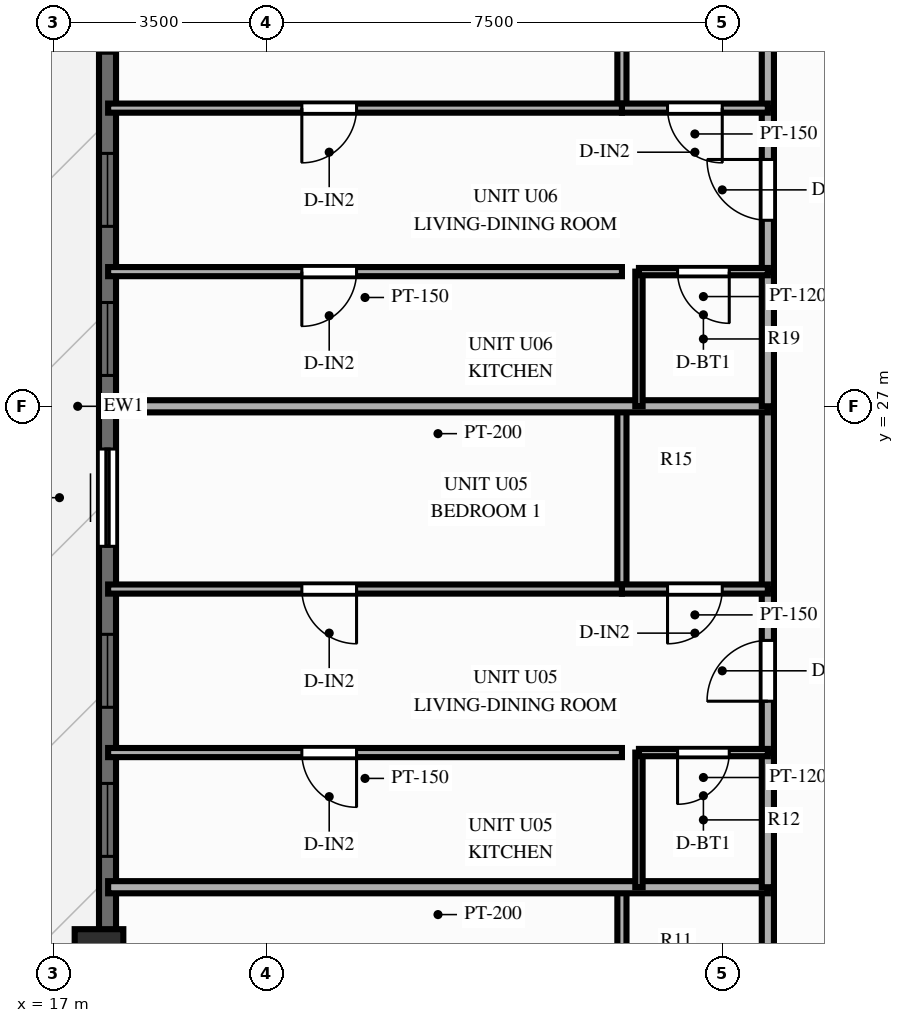
"""IFC4 building model, lengths in metres.
Left out: names, types, materials, properties, quantities, classifications, styles, units other than length and angle.
Written with IfcOpenShell. Run it as: python <this file> out.ifc"""

import sys

from ifc_helpers import new_model, si_unit, direction, frame, frame_2d, origin, origin_2d, place, context, subcontext, project, spatial, rectangle, extrude, source, transform, mapped, element, fill, save


model = new_model("IFC4")
c1 = context("Model", 3, precision=1e-05, world=origin(), true_north=direction((0.0, 1.0)))
c2 = subcontext(c1, "Body", "Model", "MODEL_VIEW")
j1 = project(units=[si_unit("LENGTHUNIT", "METRE"), si_unit("PLANEANGLEUNIT", "RADIAN")], contexts=[c1])
p1 = place(None, origin())
s1 = spatial("IfcSite", under=j1, at=p1, CompositionType="ELEMENT")
p2 = place(p1, origin())
s2 = spatial("IfcBuilding", under=s1, at=p2, CompositionType="ELEMENT")
p3 = place(p2, frame((0.0, 0.0, 192.7)))
s3 = spatial("IfcBuildingStorey", under=s2, at=p3, CompositionType="ELEMENT", Elevation=192.7)
m1 = source(origin(), c2, "Body", "SweptSolid", [
    extrude(rectangle(XDim=0.8, YDim=0.8, at=origin_2d()), origin(), (0.0, 0.0, 1.0), 3.9),
])
p4 = place(p3, frame((17.75, 18.0, 0.0), z_axis=(0.0, 0.0, 1.0), x_axis=(1.0, 0.0, 0.0)))
e1 = element("IfcColumn", 1, at=p4, inside=s3, PredefinedType="COLUMN", context=c2, shape_type="MappedRepresentation", body=[
    mapped(m1, transform((0.0, 0.0, 0.0), scale=1.0)),
])
p5 = place(p3, frame((17.89, 11.0, 0.0), z_axis=(0.0, 0.0, 1.0), x_axis=(0.0, 1.0, 0.0)))
e2 = element("IfcWall", 2, at=p5, inside=s3, PredefinedType="SOLIDWALL", context=c2, shape_type="SweptSolid", body=[
    extrude(rectangle(XDim=32.0, YDim=0.28, at=frame_2d((16.0, 0.0))), origin(), (0.0, 0.0, 1.0), 2.44),
])
p6 = place(p5, frame((0.717, 0.0, 0.25)))
e3 = element("IfcOpeningElement", 3, at=p6, cuts=e2, PredefinedType="OPENING", context=c2, shape_type="SweptSolid", body=[
    extrude(rectangle(XDim=1.2, YDim=1.5, at=frame_2d((0.6, 0.75))), frame((0.0, 0.152, 0.0), z_axis=(0.0, -1.0, 0.0), x_axis=(1.0, 0.0, 0.0)), (0.0, 0.0, 1.0), 0.304),
])
p7 = place(p5, frame((3.139, 0.0, 0.25)))
e4 = element("IfcOpeningElement", 4, at=p7, cuts=e2, PredefinedType="OPENING", context=c2, shape_type="SweptSolid", body=[
    extrude(rectangle(XDim=1.2, YDim=1.5, at=frame_2d((0.6, 0.75))), frame((0.0, 0.152, 0.0), z_axis=(0.0, -1.0, 0.0), x_axis=(1.0, 0.0, 0.0)), (0.0, 0.0, 1.0), 0.304),
])
p8 = place(p5, frame((5.447, 0.0, 0.25)))
e5 = element("IfcOpeningElement", 5, at=p8, cuts=e2, PredefinedType="OPENING", context=c2, shape_type="SweptSolid", body=[
    extrude(rectangle(XDim=0.95, YDim=1.5, at=frame_2d((0.475, 0.75))), frame((0.0, 0.152, 0.0), z_axis=(0.0, -1.0, 0.0), x_axis=(1.0, 0.0, 0.0)), (0.0, 0.0, 1.0), 0.304),
])
p9 = place(p5, frame((8.597, 0.0, 0.25)))
e6 = element("IfcOpeningElement", 6, at=p9, cuts=e2, PredefinedType="OPENING", context=c2, shape_type="SweptSolid", body=[
    extrude(rectangle(XDim=1.2, YDim=1.5, at=frame_2d((0.6, 0.75))), frame((0.0, 0.152, 0.0), z_axis=(0.0, -1.0, 0.0), x_axis=(1.0, 0.0, 0.0)), (0.0, 0.0, 1.0), 0.304),
])
p10 = place(p5, frame((11.05, 0.0, 0.25)))
e7 = element("IfcOpeningElement", 7, at=p10, cuts=e2, PredefinedType="OPENING", context=c2, shape_type="SweptSolid", body=[
    extrude(rectangle(XDim=1.2, YDim=1.5, at=frame_2d((0.6, 0.75))), frame((0.0, 0.152, 0.0), z_axis=(0.0, -1.0, 0.0), x_axis=(1.0, 0.0, 0.0)), (0.0, 0.0, 1.0), 0.304),
])
p11 = place(p5, frame((13.697, 0.0, 0.0)))
e8 = element("IfcOpeningElement", 8, at=p11, cuts=e2, PredefinedType="OPENING", context=c2, shape_type="SweptSolid", body=[
    extrude(rectangle(XDim=1.6, YDim=2.15, at=frame_2d((0.8, 1.075))), frame((0.0, 0.152, 0.0), z_axis=(0.0, -1.0, 0.0), x_axis=(1.0, 0.0, 0.0)), (0.0, 0.0, 1.0), 0.304),
])
p12 = place(p5, frame((16.507, 0.0, 0.25)))
e9 = element("IfcOpeningElement", 9, at=p12, cuts=e2, PredefinedType="OPENING", context=c2, shape_type="SweptSolid", body=[
    extrude(rectangle(XDim=1.2, YDim=1.5, at=frame_2d((0.6, 0.75))), frame((0.0, 0.152, 0.0), z_axis=(0.0, -1.0, 0.0), x_axis=(1.0, 0.0, 0.0)), (0.0, 0.0, 1.0), 0.304),
])
p13 = place(p5, frame((18.959, 0.0, 0.25)))
e10 = element("IfcOpeningElement", 10, at=p13, cuts=e2, PredefinedType="OPENING", context=c2, shape_type="SweptSolid", body=[
    extrude(rectangle(XDim=1.2, YDim=1.5, at=frame_2d((0.6, 0.75))), frame((0.0, 0.152, 0.0), z_axis=(0.0, -1.0, 0.0), x_axis=(1.0, 0.0, 0.0)), (0.0, 0.0, 1.0), 0.304),
])
p14 = place(p5, frame((21.807, 0.0, 0.25)))
e11 = element("IfcOpeningElement", 11, at=p14, cuts=e2, PredefinedType="OPENING", context=c2, shape_type="SweptSolid", body=[
    extrude(rectangle(XDim=1.2, YDim=1.5, at=frame_2d((0.6, 0.75))), frame((0.0, 0.152, 0.0), z_axis=(0.0, -1.0, 0.0), x_axis=(1.0, 0.0, 0.0)), (0.0, 0.0, 1.0), 0.304),
])
p15 = place(p5, frame((26.967, 0.0, 0.25)))
e12 = element("IfcOpeningElement", 12, at=p15, cuts=e2, PredefinedType="OPENING", context=c2, shape_type="SweptSolid", body=[
    extrude(rectangle(XDim=1.2, YDim=1.5, at=frame_2d((0.6, 0.75))), frame((0.0, 0.152, 0.0), z_axis=(0.0, -1.0, 0.0), x_axis=(1.0, 0.0, 0.0)), (0.0, 0.0, 1.0), 0.304),
])
p16 = place(p5, frame((29.687, 0.0, 0.25)))
e13 = element("IfcOpeningElement", 13, at=p16, cuts=e2, PredefinedType="OPENING", context=c2, shape_type="SweptSolid", body=[
    extrude(rectangle(XDim=1.2, YDim=1.5, at=frame_2d((0.6, 0.75))), frame((0.0, 0.152, 0.0), z_axis=(0.0, -1.0, 0.0), x_axis=(1.0, 0.0, 0.0)), (0.0, 0.0, 1.0), 0.304),
])
p17 = place(p3, frame((28.75, 16.084, 0.0), z_axis=(0.0, 0.0, 1.0), x_axis=(0.0, 1.0, 0.0)))
e14 = element("IfcWall", 14, at=p17, inside=s3, PredefinedType="PARTITIONING", context=c2, shape_type="SweptSolid", body=[
    extrude(rectangle(XDim=3.006, YDim=0.2, at=frame_2d((1.503, 0.0))), origin(), (0.0, 0.0, 1.0), 3.56),
])
p18 = place(p3, frame((26.35, 16.084, 0.0), z_axis=(0.0, 0.0, 1.0), x_axis=(0.0, 1.0, 0.0)))
e15 = element("IfcWall", 15, at=p18, inside=s3, PredefinedType="PARTITIONING", context=c2, shape_type="SweptSolid", body=[
    extrude(rectangle(XDim=3.006, YDim=0.15, at=frame_2d((1.503, 0.0))), origin(), (0.0, 0.0, 1.0), 3.56),
])
p19 = place(p3, frame((28.75, 19.09, 0.0), z_axis=(0.0, 0.0, 1.0), x_axis=(-1.0, 0.0, 0.0)))
e16 = element("IfcWall", 16, at=p19, inside=s3, PredefinedType="PARTITIONING", context=c2, shape_type="SweptSolid", body=[
    extrude(rectangle(XDim=10.85, YDim=0.2, at=frame_2d((5.425, 0.0))), origin(), (0.0, 0.0, 1.0), 3.56),
])
p20 = place(p3, frame((28.75, 19.09, 0.0), z_axis=(0.0, 0.0, 1.0), x_axis=(0.0, 1.0, 0.0)))
e17 = element("IfcWall", 17, at=p20, inside=s3, PredefinedType="PARTITIONING", context=c2, shape_type="SweptSolid", body=[
    extrude(rectangle(XDim=2.215, YDim=0.2, at=frame_2d((1.107, 0.0))), origin(), (0.0, 0.0, 1.0), 3.56),
])
p21 = place(p3, frame((28.75, 21.305, 0.0), z_axis=(0.0, 0.0, 1.0), x_axis=(0.0, 1.0, 0.0)))
e18 = element("IfcWall", 18, at=p21, inside=s3, PredefinedType="PARTITIONING", context=c2, shape_type="SweptSolid", body=[
    extrude(rectangle(XDim=2.689, YDim=0.2, at=frame_2d((1.345, 0.0))), origin(), (0.0, 0.0, 1.0), 3.56),
])
p22 = place(p21, frame((0.845, 0.0, 0.0)))
e19 = element("IfcOpeningElement", 19, at=p22, cuts=e18, PredefinedType="OPENING", context=c2, shape_type="SweptSolid", body=[
    extrude(rectangle(XDim=1.0, YDim=2.15, at=frame_2d((0.5, 1.075))), frame((0.0, 0.112, 0.0), z_axis=(0.0, -1.0, 0.0), x_axis=(1.0, 0.0, 0.0)), (0.0, 0.0, 1.0), 0.224),
])
p23 = place(p3, frame((28.75, 23.994, 0.0), z_axis=(0.0, 0.0, 1.0), x_axis=(0.0, 1.0, 0.0)))
e20 = element("IfcWall", 20, at=p23, inside=s3, PredefinedType="PARTITIONING", context=c2, shape_type="SweptSolid", body=[
    extrude(rectangle(XDim=3.006, YDim=0.2, at=frame_2d((1.503, 0.0))), origin(), (0.0, 0.0, 1.0), 3.56),
])
p24 = place(p3, frame((26.63, 19.09, 0.0), z_axis=(0.0, 0.0, 1.0), x_axis=(0.0, 1.0, 0.0)))
e21 = element("IfcWall", 21, at=p24, inside=s3, PredefinedType="PARTITIONING", context=c2, shape_type="SweptSolid", body=[
    extrude(rectangle(XDim=2.215, YDim=0.12, at=frame_2d((1.107, 0.0))), origin(), (0.0, 0.0, 1.0), 3.56),
])
p25 = place(p3, frame((26.35, 23.994, 0.0), z_axis=(0.0, 0.0, 1.0), x_axis=(0.0, 1.0, 0.0)))
e22 = element("IfcWall", 22, at=p25, inside=s3, PredefinedType="PARTITIONING", context=c2, shape_type="SweptSolid", body=[
    extrude(rectangle(XDim=3.006, YDim=0.15, at=frame_2d((1.503, 0.0))), origin(), (0.0, 0.0, 1.0), 3.56),
])
p26 = place(p3, frame((28.75, 21.305, 0.0), z_axis=(0.0, 0.0, 1.0), x_axis=(-1.0, 0.0, 0.0)))
e23 = element("IfcWall", 23, at=p26, inside=s3, PredefinedType="PARTITIONING", context=c2, shape_type="SweptSolid", body=[
    extrude(rectangle(XDim=2.12, YDim=0.12, at=frame_2d((1.06, 0.0))), origin(), (0.0, 0.0, 1.0), 3.56),
])
p27 = place(p26, frame((0.635, 0.0, 0.0)))
e24 = element("IfcOpeningElement", 24, at=p27, cuts=e23, PredefinedType="OPENING", context=c2, shape_type="SweptSolid", body=[
    extrude(rectangle(XDim=0.85, YDim=2.05, at=frame_2d((0.425, 1.025))), frame((0.0, 0.072, 0.0), z_axis=(0.0, -1.0, 0.0), x_axis=(1.0, 0.0, 0.0)), (0.0, 0.0, 1.0), 0.144),
])
p28 = place(p3, frame((26.35, 21.305, 0.0), z_axis=(0.0, 0.0, 1.0), x_axis=(-1.0, 0.0, 0.0)))
e25 = element("IfcWall", 25, at=p28, inside=s3, PredefinedType="PARTITIONING", context=c2, shape_type="SweptSolid", body=[
    extrude(rectangle(XDim=8.45, YDim=0.15, at=frame_2d((4.225, 0.0))), origin(), (0.0, 0.0, 1.0), 3.56),
])
p29 = place(p28, frame((4.364, 0.0, 0.0)))
e26 = element("IfcOpeningElement", 26, at=p29, cuts=e25, PredefinedType="OPENING", context=c2, shape_type="SweptSolid", body=[
    extrude(rectangle(XDim=0.9, YDim=2.1, at=frame_2d((0.45, 1.05))), frame((0.0, 0.087, 0.0), z_axis=(0.0, -1.0, 0.0), x_axis=(1.0, 0.0, 0.0)), (0.0, 0.0, 1.0), 0.174),
])
p30 = place(p3, frame((28.75, 23.994, 0.0), z_axis=(0.0, 0.0, 1.0), x_axis=(-1.0, 0.0, 0.0)))
e27 = element("IfcWall", 27, at=p30, inside=s3, PredefinedType="PARTITIONING", context=c2, shape_type="SweptSolid", body=[
    extrude(rectangle(XDim=2.4, YDim=0.15, at=frame_2d((1.2, 0.0))), origin(), (0.0, 0.0, 1.0), 3.56),
])
p31 = place(p30, frame((0.75, 0.0, 0.0)))
e28 = element("IfcOpeningElement", 28, at=p31, cuts=e27, PredefinedType="OPENING", context=c2, shape_type="SweptSolid", body=[
    extrude(rectangle(XDim=0.9, YDim=2.1, at=frame_2d((0.45, 1.05))), frame((0.0, 0.087, 0.0), z_axis=(0.0, -1.0, 0.0), x_axis=(1.0, 0.0, 0.0)), (0.0, 0.0, 1.0), 0.174),
])
p32 = place(p3, frame((26.35, 23.994, 0.0), z_axis=(0.0, 0.0, 1.0), x_axis=(-1.0, 0.0, 0.0)))
e29 = element("IfcWall", 29, at=p32, inside=s3, PredefinedType="PARTITIONING", context=c2, shape_type="SweptSolid", body=[
    extrude(rectangle(XDim=8.45, YDim=0.15, at=frame_2d((4.225, 0.0))), origin(), (0.0, 0.0, 1.0), 3.56),
])
p33 = place(p32, frame((4.364, 0.0, 0.0)))
e30 = element("IfcOpeningElement", 30, at=p33, cuts=e29, PredefinedType="OPENING", context=c2, shape_type="SweptSolid", body=[
    extrude(rectangle(XDim=0.9, YDim=2.1, at=frame_2d((0.45, 1.05))), frame((0.0, 0.087, 0.0), z_axis=(0.0, -1.0, 0.0), x_axis=(1.0, 0.0, 0.0)), (0.0, 0.0, 1.0), 0.174),
])
p34 = place(p3, frame((28.75, 27.0, 0.0), z_axis=(0.0, 0.0, 1.0), x_axis=(-1.0, 0.0, 0.0)))
e31 = element("IfcWall", 31, at=p34, inside=s3, PredefinedType="PARTITIONING", context=c2, shape_type="SweptSolid", body=[
    extrude(rectangle(XDim=10.85, YDim=0.2, at=frame_2d((5.425, 0.0))), origin(), (0.0, 0.0, 1.0), 3.56),
])
p35 = place(p3, frame((28.75, 27.0, 0.0), z_axis=(0.0, 0.0, 1.0), x_axis=(0.0, 1.0, 0.0)))
e32 = element("IfcWall", 32, at=p35, inside=s3, PredefinedType="PARTITIONING", context=c2, shape_type="SweptSolid", body=[
    extrude(rectangle(XDim=2.215, YDim=0.2, at=frame_2d((1.107, 0.0))), origin(), (0.0, 0.0, 1.0), 3.56),
])
p36 = place(p3, frame((28.75, 29.215, 0.0), z_axis=(0.0, 0.0, 1.0), x_axis=(0.0, 1.0, 0.0)))
e33 = element("IfcWall", 33, at=p36, inside=s3, PredefinedType="PARTITIONING", context=c2, shape_type="SweptSolid", body=[
    extrude(rectangle(XDim=2.689, YDim=0.2, at=frame_2d((1.345, 0.0))), origin(), (0.0, 0.0, 1.0), 3.56),
])
p37 = place(p36, frame((0.845, 0.0, 0.0)))
e34 = element("IfcOpeningElement", 34, at=p37, cuts=e33, PredefinedType="OPENING", context=c2, shape_type="SweptSolid", body=[
    extrude(rectangle(XDim=1.0, YDim=2.15, at=frame_2d((0.5, 1.075))), frame((0.0, 0.112, 0.0), z_axis=(0.0, -1.0, 0.0), x_axis=(1.0, 0.0, 0.0)), (0.0, 0.0, 1.0), 0.224),
])
p38 = place(p3, frame((28.75, 31.904, 0.0), z_axis=(0.0, 0.0, 1.0), x_axis=(0.0, 1.0, 0.0)))
e35 = element("IfcWall", 35, at=p38, inside=s3, PredefinedType="PARTITIONING", context=c2, shape_type="SweptSolid", body=[
    extrude(rectangle(XDim=3.006, YDim=0.2, at=frame_2d((1.503, 0.0))), origin(), (0.0, 0.0, 1.0), 3.56),
])
p39 = place(p3, frame((26.63, 27.0, 0.0), z_axis=(0.0, 0.0, 1.0), x_axis=(0.0, 1.0, 0.0)))
e36 = element("IfcWall", 36, at=p39, inside=s3, PredefinedType="PARTITIONING", context=c2, shape_type="SweptSolid", body=[
    extrude(rectangle(XDim=2.215, YDim=0.12, at=frame_2d((1.107, 0.0))), origin(), (0.0, 0.0, 1.0), 3.56),
])
p40 = place(p3, frame((26.35, 31.904, 0.0), z_axis=(0.0, 0.0, 1.0), x_axis=(0.0, 1.0, 0.0)))
e37 = element("IfcWall", 37, at=p40, inside=s3, PredefinedType="PARTITIONING", context=c2, shape_type="SweptSolid", body=[
    extrude(rectangle(XDim=3.006, YDim=0.15, at=frame_2d((1.503, 0.0))), origin(), (0.0, 0.0, 1.0), 3.56),
])
p41 = place(p3, frame((28.75, 29.215, 0.0), z_axis=(0.0, 0.0, 1.0), x_axis=(-1.0, 0.0, 0.0)))
e38 = element("IfcWall", 38, at=p41, inside=s3, PredefinedType="PARTITIONING", context=c2, shape_type="SweptSolid", body=[
    extrude(rectangle(XDim=2.12, YDim=0.12, at=frame_2d((1.06, 0.0))), origin(), (0.0, 0.0, 1.0), 3.56),
])
p42 = place(p41, frame((0.635, 0.0, 0.0)))
e39 = element("IfcOpeningElement", 39, at=p42, cuts=e38, PredefinedType="OPENING", context=c2, shape_type="SweptSolid", body=[
    extrude(rectangle(XDim=0.85, YDim=2.05, at=frame_2d((0.425, 1.025))), frame((0.0, 0.072, 0.0), z_axis=(0.0, -1.0, 0.0), x_axis=(1.0, 0.0, 0.0)), (0.0, 0.0, 1.0), 0.144),
])
p43 = place(p3, frame((26.35, 29.215, 0.0), z_axis=(0.0, 0.0, 1.0), x_axis=(-1.0, 0.0, 0.0)))
e40 = element("IfcWall", 40, at=p43, inside=s3, PredefinedType="PARTITIONING", context=c2, shape_type="SweptSolid", body=[
    extrude(rectangle(XDim=8.45, YDim=0.15, at=frame_2d((4.225, 0.0))), origin(), (0.0, 0.0, 1.0), 3.56),
])
p44 = place(p43, frame((4.364, 0.0, 0.0)))
e41 = element("IfcOpeningElement", 41, at=p44, cuts=e40, PredefinedType="OPENING", context=c2, shape_type="SweptSolid", body=[
    extrude(rectangle(XDim=0.9, YDim=2.1, at=frame_2d((0.45, 1.05))), frame((0.0, 0.087, 0.0), z_axis=(0.0, -1.0, 0.0), x_axis=(1.0, 0.0, 0.0)), (0.0, 0.0, 1.0), 0.174),
])
p45 = place(p3, frame((28.75, 31.904, 0.0), z_axis=(0.0, 0.0, 1.0), x_axis=(-1.0, 0.0, 0.0)))
e42 = element("IfcWall", 42, at=p45, inside=s3, PredefinedType="PARTITIONING", context=c2, shape_type="SweptSolid", body=[
    extrude(rectangle(XDim=2.4, YDim=0.15, at=frame_2d((1.2, 0.0))), origin(), (0.0, 0.0, 1.0), 3.29),
])
p46 = place(p45, frame((0.75, 0.0, 0.0)))
e43 = element("IfcOpeningElement", 43, at=p46, cuts=e42, PredefinedType="OPENING", context=c2, shape_type="SweptSolid", body=[
    extrude(rectangle(XDim=0.9, YDim=2.1, at=frame_2d((0.45, 1.05))), frame((0.0, 0.087, 0.0), z_axis=(0.0, -1.0, 0.0), x_axis=(1.0, 0.0, 0.0)), (0.0, 0.0, 1.0), 0.174),
])
p47 = place(p3, frame((26.35, 31.904, 0.0), z_axis=(0.0, 0.0, 1.0), x_axis=(-1.0, 0.0, 0.0)))
e44 = element("IfcWall", 44, at=p47, inside=s3, PredefinedType="PARTITIONING", context=c2, shape_type="SweptSolid", body=[
    extrude(rectangle(XDim=8.45, YDim=0.15, at=frame_2d((4.225, 0.0))), origin(), (0.0, 0.0, 1.0), 3.29),
])
p48 = place(p47, frame((4.364, 0.0, 0.0)))
e45 = element("IfcOpeningElement", 45, at=p48, cuts=e44, PredefinedType="OPENING", context=c2, shape_type="SweptSolid", body=[
    extrude(rectangle(XDim=0.9, YDim=2.1, at=frame_2d((0.45, 1.05))), frame((0.0, 0.087, 0.0), z_axis=(0.0, -1.0, 0.0), x_axis=(1.0, 0.0, 0.0)), (0.0, 0.0, 1.0), 0.174),
])
m2 = source(origin(), c2, "Body", "SweptSolid", [
    extrude(rectangle(XDim=1.2, YDim=1.5, at=frame_2d((0.6, 0.75))), frame((0.0, 0.03, 0.0), z_axis=(0.0, -1.0, 0.0), x_axis=(1.0, 0.0, 0.0)), (0.0, 0.0, 1.0), 0.06),
])
p49 = place(p9, origin())
e46 = element("IfcWindow", 46, at=p49, inside=s3, PartitioningType="SINGLE_PANEL", PredefinedType="WINDOW", context=c2, shape_type="MappedRepresentation", body=[
    mapped(m2, transform((0.0, 0.0, 0.0), scale=1.0)),
])
fill(e6, e46)
p50 = place(p10, origin())
e47 = element("IfcWindow", 47, at=p50, inside=s3, PartitioningType="SINGLE_PANEL", PredefinedType="WINDOW", context=c2, shape_type="MappedRepresentation", body=[
    mapped(m2, transform((0.0, 0.0, 0.0), scale=1.0)),
])
fill(e7, e47)
m3 = source(origin(), c2, "Body", "SweptSolid", [
    extrude(rectangle(XDim=1.6, YDim=2.15, at=frame_2d((0.8, 1.075))), frame((0.0, 0.025, 0.0), z_axis=(0.0, -1.0, 0.0), x_axis=(1.0, 0.0, 0.0)), (0.0, 0.0, 1.0), 0.05),
])
p51 = place(p11, origin())
e48 = element("IfcDoor", 48, at=p51, inside=s3, OperationType="SLIDING_TO_LEFT", PredefinedType="DOOR", context=c2, shape_type="MappedRepresentation", body=[
    mapped(m3, transform((0.0, 0.0, 0.0), scale=1.0)),
])
fill(e8, e48)
p52 = place(p12, origin())
e49 = element("IfcWindow", 49, at=p52, inside=s3, PartitioningType="SINGLE_PANEL", PredefinedType="WINDOW", context=c2, shape_type="MappedRepresentation", body=[
    mapped(m2, transform((0.0, 0.0, 0.0), scale=1.0)),
])
fill(e9, e49)
p53 = place(p13, origin())
e50 = element("IfcWindow", 50, at=p53, inside=s3, PartitioningType="SINGLE_PANEL", PredefinedType="WINDOW", context=c2, shape_type="MappedRepresentation", body=[
    mapped(m2, transform((0.0, 0.0, 0.0), scale=1.0)),
])
fill(e10, e50)
p54 = place(p14, origin())
e51 = element("IfcWindow", 51, at=p54, inside=s3, PartitioningType="SINGLE_PANEL", PredefinedType="WINDOW", context=c2, shape_type="MappedRepresentation", body=[
    mapped(m2, transform((0.0, 0.0, 0.0), scale=1.0)),
])
fill(e11, e51)
m4 = source(origin(), c2, "Body", "SweptSolid", [
    extrude(rectangle(XDim=1.0, YDim=2.15, at=frame_2d((0.5, 1.075))), frame((0.0, 0.025, 0.0), z_axis=(0.0, -1.0, 0.0), x_axis=(1.0, 0.0, 0.0)), (0.0, 0.0, 1.0), 0.05),
])
p55 = place(p22, origin())
e52 = element("IfcDoor", 52, at=p55, inside=s3, OperationType="SINGLE_SWING_LEFT", PredefinedType="DOOR", context=c2, shape_type="MappedRepresentation", body=[
    mapped(m4, transform((0.0, 0.0, 0.0), scale=1.0)),
])
fill(e19, e52)
m5 = source(origin(), c2, "Body", "SweptSolid", [
    extrude(rectangle(XDim=0.85, YDim=2.05, at=frame_2d((0.425, 1.025))), frame((0.0, 0.025, 0.0), z_axis=(0.0, -1.0, 0.0), x_axis=(1.0, 0.0, 0.0)), (0.0, 0.0, 1.0), 0.05),
])
p56 = place(p27, origin())
e53 = element("IfcDoor", 53, at=p56, inside=s3, OperationType="SINGLE_SWING_RIGHT", PredefinedType="DOOR", context=c2, shape_type="MappedRepresentation", body=[
    mapped(m5, transform((0.0, 0.0, 0.0), scale=1.0)),
])
fill(e24, e53)
m6 = source(origin(), c2, "Body", "SweptSolid", [
    extrude(rectangle(XDim=0.9, YDim=2.1, at=frame_2d((0.45, 1.05))), frame((0.0, 0.025, 0.0), z_axis=(0.0, -1.0, 0.0), x_axis=(1.0, 0.0, 0.0)), (0.0, 0.0, 1.0), 0.05),
])
p57 = place(p29, origin())
e54 = element("IfcDoor", 54, at=p57, inside=s3, OperationType="SINGLE_SWING_LEFT", PredefinedType="DOOR", context=c2, shape_type="MappedRepresentation", body=[
    mapped(m6, transform((0.0, 0.0, 0.0), scale=1.0)),
])
fill(e26, e54)
p58 = place(p31, origin())
e55 = element("IfcDoor", 55, at=p58, inside=s3, OperationType="SINGLE_SWING_RIGHT", PredefinedType="DOOR", context=c2, shape_type="MappedRepresentation", body=[
    mapped(m6, transform((0.0, 0.0, 0.0), scale=1.0)),
])
fill(e28, e55)
p59 = place(p33, origin())
e56 = element("IfcDoor", 56, at=p59, inside=s3, OperationType="SINGLE_SWING_LEFT", PredefinedType="DOOR", context=c2, shape_type="MappedRepresentation", body=[
    mapped(m6, transform((0.0, 0.0, 0.0), scale=1.0)),
])
fill(e30, e56)
p60 = place(p37, origin())
e57 = element("IfcDoor", 57, at=p60, inside=s3, OperationType="SINGLE_SWING_RIGHT", PredefinedType="DOOR", context=c2, shape_type="MappedRepresentation", body=[
    mapped(m4, transform((0.0, 0.0, 0.0), scale=1.0)),
])
fill(e34, e57)
p61 = place(p42, origin())
e58 = element("IfcDoor", 58, at=p61, inside=s3, OperationType="SINGLE_SWING_LEFT", PredefinedType="DOOR", context=c2, shape_type="MappedRepresentation", body=[
    mapped(m5, transform((0.0, 0.0, 0.0), scale=1.0)),
])
fill(e39, e58)
p62 = place(p44, origin())
e59 = element("IfcDoor", 59, at=p62, inside=s3, OperationType="SINGLE_SWING_RIGHT", PredefinedType="DOOR", context=c2, shape_type="MappedRepresentation", body=[
    mapped(m6, transform((0.0, 0.0, 0.0), scale=1.0)),
])
fill(e41, e59)
p63 = place(p46, origin())
e60 = element("IfcDoor", 60, at=p63, inside=s3, OperationType="SINGLE_SWING_LEFT", PredefinedType="DOOR", context=c2, shape_type="MappedRepresentation", body=[
    mapped(m6, transform((0.0, 0.0, 0.0), scale=1.0)),
])
fill(e43, e60)
p64 = place(p48, origin())
e61 = element("IfcDoor", 61, at=p64, inside=s3, OperationType="SINGLE_SWING_RIGHT", PredefinedType="DOOR", context=c2, shape_type="MappedRepresentation", body=[
    mapped(m6, transform((0.0, 0.0, 0.0), scale=1.0)),
])
fill(e45, e61)
save(model, sys.argv[1])
